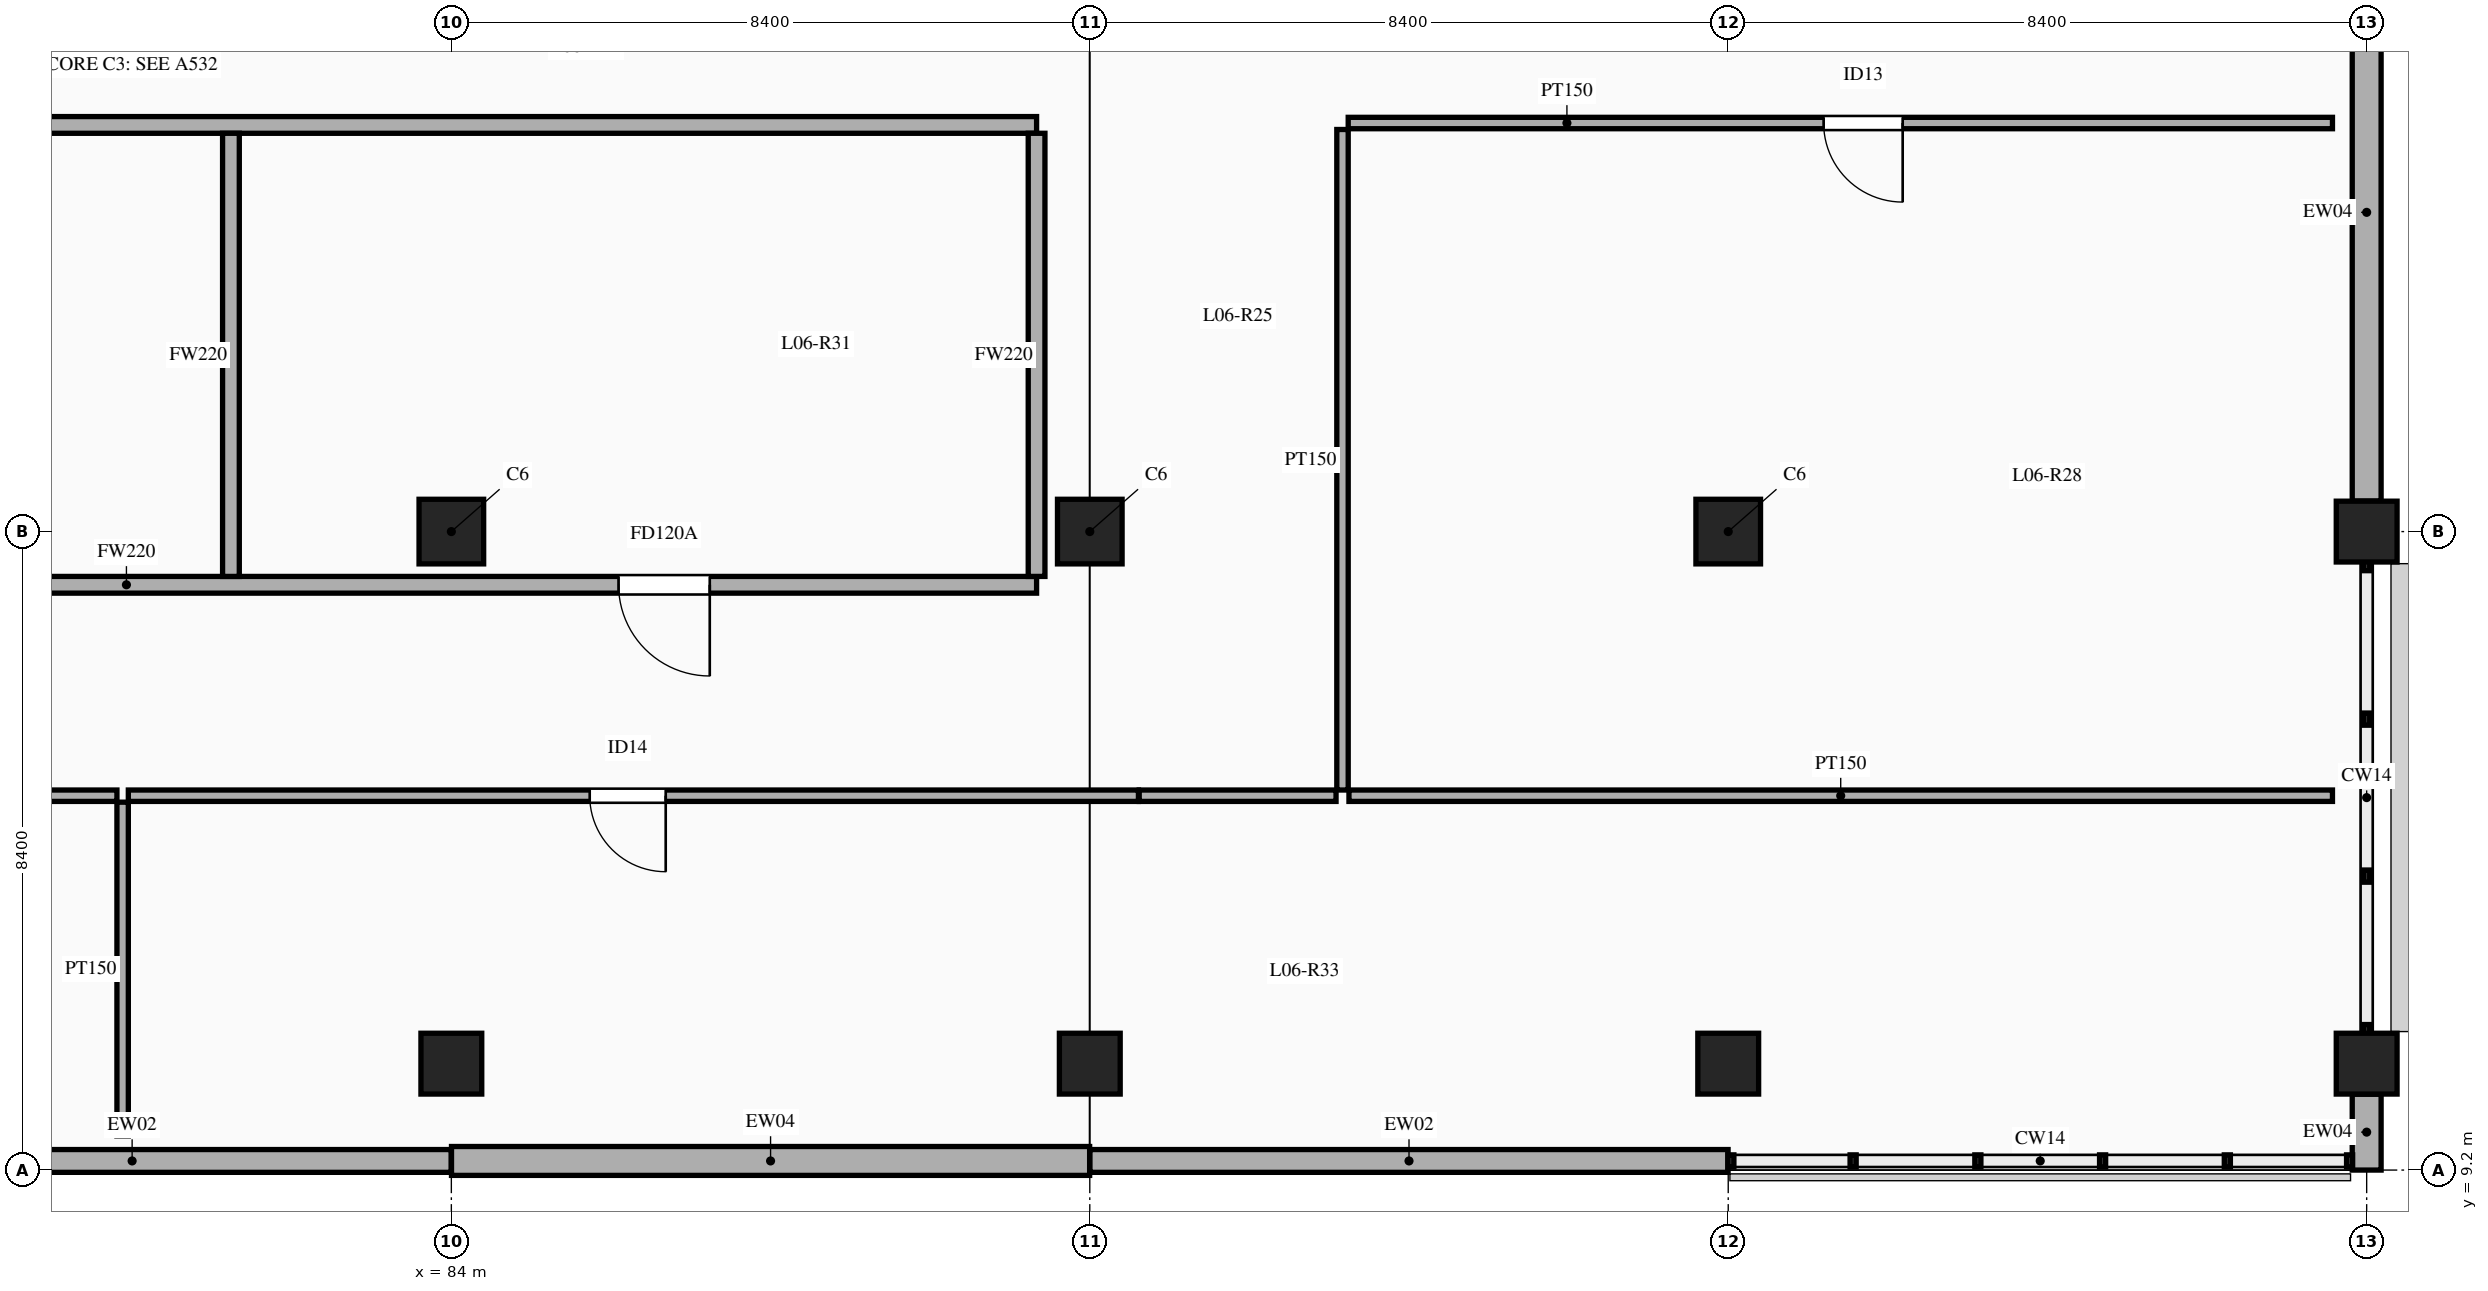
"""IFC4 building model, lengths in metres.
Left out: names, types, materials, properties, quantities, classifications, styles, units other than length and angle.
Written with IfcOpenShell. Run it as: python <this file> out.ifc"""

import sys

from ifc_helpers import new_model, si_unit, direction, frame, frame_2d, origin, origin_2d, place, context, subcontext, project, spatial, rectangle, extrude, element, fill, save


model = new_model("IFC4")
c1 = context("Model", 3, precision=1e-05, world=origin(), true_north=direction((0.0, 1.0)))
c2 = subcontext(c1, "Body", "Model", "MODEL_VIEW")
j1 = project(units=[si_unit("LENGTHUNIT", "METRE"), si_unit("PLANEANGLEUNIT", "RADIAN")], contexts=[c1])
p1 = place(None, origin())
s1 = spatial("IfcSite", under=j1, at=p1, CompositionType="ELEMENT")
p2 = place(p1, origin())
s2 = spatial("IfcBuilding", under=s1, at=p2, CompositionType="ELEMENT")
p3 = place(p2, frame((0.0, 0.0, 28.5)))
s3 = spatial("IfcBuildingStorey", under=s2, at=p3, CompositionType="ELEMENT", Elevation=28.5)
p4 = place(p3, frame((84.0, 10.6, 0.0), z_axis=(0.0, 0.0, 1.0), x_axis=(1.0, 0.0, 0.0)))
e1 = element("IfcColumn", 1, at=p4, inside=s3, PredefinedType="COLUMN", context=c2, shape_type="SweptSolid", body=[
    extrude(rectangle(XDim=0.8, YDim=0.8, at=origin_2d()), origin(), (0.0, 0.0, 1.0), 4.5),
])
p5 = place(p3, frame((84.0, 17.6, 0.0), z_axis=(0.0, 0.0, 1.0), x_axis=(1.0, 0.0, 0.0)))
e2 = element("IfcColumn", 2, at=p5, inside=s3, PredefinedType="COLUMN", context=c2, shape_type="SweptSolid", body=[
    extrude(rectangle(XDim=0.85, YDim=0.85, at=origin_2d()), origin(), (0.0, 0.0, 1.0), 4.5),
])
p6 = place(p3, frame((92.4, 10.6, 0.0), z_axis=(0.0, 0.0, 1.0), x_axis=(1.0, 0.0, 0.0)))
e3 = element("IfcColumn", 3, at=p6, inside=s3, PredefinedType="COLUMN", context=c2, shape_type="SweptSolid", body=[
    extrude(rectangle(XDim=0.8, YDim=0.8, at=origin_2d()), origin(), (0.0, 0.0, 1.0), 4.5),
])
p7 = place(p3, frame((92.4, 17.6, 0.0), z_axis=(0.0, 0.0, 1.0), x_axis=(1.0, 0.0, 0.0)))
e4 = element("IfcColumn", 4, at=p7, inside=s3, PredefinedType="COLUMN", context=c2, shape_type="SweptSolid", body=[
    extrude(rectangle(XDim=0.85, YDim=0.85, at=origin_2d()), origin(), (0.0, 0.0, 1.0), 4.5),
])
p8 = place(p3, frame((100.8, 10.6, 0.0), z_axis=(0.0, 0.0, 1.0), x_axis=(1.0, 0.0, 0.0)))
e5 = element("IfcColumn", 5, at=p8, inside=s3, PredefinedType="COLUMN", context=c2, shape_type="SweptSolid", body=[
    extrude(rectangle(XDim=0.8, YDim=0.8, at=origin_2d()), origin(), (0.0, 0.0, 1.0), 4.5),
])
p9 = place(p3, frame((100.8, 17.6, 0.0), z_axis=(0.0, 0.0, 1.0), x_axis=(1.0, 0.0, 0.0)))
e6 = element("IfcColumn", 6, at=p9, inside=s3, PredefinedType="COLUMN", context=c2, shape_type="SweptSolid", body=[
    extrude(rectangle(XDim=0.85, YDim=0.85, at=origin_2d()), origin(), (0.0, 0.0, 1.0), 4.5),
])
for number, where, z_axis, x_axis in (
    (7, (109.2, 10.6, 0.0), (0.0, 0.0, 1.0), (1.0, 0.0, 0.0)),
    (8, (109.2, 17.6, 0.0), (0.0, 0.0, 1.0), (1.0, 0.0, 0.0)),
):
    element("IfcColumn", number, at=place(p3, frame(where, z_axis=z_axis, x_axis=x_axis)), inside=s3, PredefinedType="COLUMN", context=c2, shape_type="SweptSolid", body=[
        extrude(rectangle(XDim=0.8, YDim=0.8, at=origin_2d()), origin(), (0.0, 0.0, 1.0), 4.5),
    ])
p10 = place(p3, frame((109.2, 9.2, 0.0), z_axis=(0.0, 0.0, 1.0), x_axis=(0.0, 1.0, 0.0)))
e9 = element("IfcWall", 9, at=p10, inside=s3, PredefinedType="SOLIDWALL", context=c2, shape_type="SweptSolid", body=[
    extrude(rectangle(XDim=0.998, YDim=0.38, at=frame_2d((0.499, 0.0))), origin(), (0.0, 0.0, 1.0), 3.55),
])
p11 = place(p3, frame((75.602, 9.32, 0.0), z_axis=(0.0, 0.0, 1.0), x_axis=(1.0, 0.0, 0.0)))
e10 = element("IfcWall", 10, at=p11, inside=s3, PredefinedType="SOLIDWALL", context=c2, shape_type="SweptSolid", body=[
    extrude(rectangle(XDim=8.396, YDim=0.3, at=frame_2d((4.198, 0.0))), origin(), (0.0, 0.0, 1.0), 3.55),
])
p12 = place(p3, frame((84.002, 9.32, 0.0), z_axis=(0.0, 0.0, 1.0), x_axis=(1.0, 0.0, 0.0)))
e11 = element("IfcWall", 11, at=p12, inside=s3, PredefinedType="SOLIDWALL", context=c2, shape_type="SweptSolid", body=[
    extrude(rectangle(XDim=8.396, YDim=0.38, at=frame_2d((4.198, 0.0))), origin(), (0.0, 0.0, 1.0), 3.55),
])
p13 = place(p3, frame((92.402, 9.32, 0.0), z_axis=(0.0, 0.0, 1.0), x_axis=(1.0, 0.0, 0.0)))
e12 = element("IfcWall", 12, at=p13, inside=s3, PredefinedType="SOLIDWALL", context=c2, shape_type="SweptSolid", body=[
    extrude(rectangle(XDim=8.396, YDim=0.3, at=frame_2d((4.198, 0.0))), origin(), (0.0, 0.0, 1.0), 3.55),
])
p14 = place(p3, frame((109.2, 18.002, 0.0), z_axis=(0.0, 0.0, 1.0), x_axis=(0.0, 1.0, 0.0)))
e13 = element("IfcWall", 13, at=p14, inside=s3, PredefinedType="SOLIDWALL", context=c2, shape_type="SweptSolid", body=[
    extrude(rectangle(XDim=7.596, YDim=0.38, at=frame_2d((3.798, 0.0))), origin(), (0.0, 0.0, 1.0), 3.55),
])
p15 = place(p3, frame((59.5, 22.95, 0.0), z_axis=(0.0, 0.0, 1.0), x_axis=(1.0, 0.0, 0.0)))
e14 = element("IfcWall", 14, at=p15, inside=s3, PredefinedType="SOLIDWALL", context=c2, shape_type="SweptSolid", body=[
    extrude(rectangle(XDim=32.2, YDim=0.22, at=frame_2d((16.1, 0.0))), origin(), (0.0, 0.0, 1.0), 3.45),
])
p16 = place(p15, frame((3.0, 0.0, 0.0)))
e15 = element("IfcOpeningElement", 15, at=p16, cuts=e14, PredefinedType="OPENING", context=c2, shape_type="SweptSolid", body=[
    extrude(rectangle(XDim=1.2, YDim=2.2, at=frame_2d((0.6, 1.1))), frame((0.0, 0.12, 0.0), z_axis=(0.0, -1.0, 0.0), x_axis=(1.0, 0.0, 0.0)), (0.0, 0.0, 1.0), 0.24),
])
p17 = place(p3, frame((59.5, 16.9, 0.0), z_axis=(0.0, 0.0, 1.0), x_axis=(1.0, 0.0, 0.0)))
e16 = element("IfcWall", 16, at=p17, inside=s3, PredefinedType="SOLIDWALL", context=c2, shape_type="SweptSolid", body=[
    extrude(rectangle(XDim=32.2, YDim=0.22, at=frame_2d((16.1, 0.0))), origin(), (0.0, 0.0, 1.0), 3.45),
])
p18 = place(p17, frame((12.7, 0.0, 0.0)))
e17 = element("IfcOpeningElement", 17, at=p18, cuts=e16, PredefinedType="OPENING", context=c2, shape_type="SweptSolid", body=[
    extrude(rectangle(XDim=1.05, YDim=2.15, at=frame_2d((0.525, 1.075))), frame((0.0, 0.12, 0.0), z_axis=(0.0, -1.0, 0.0), x_axis=(1.0, 0.0, 0.0)), (0.0, 0.0, 1.0), 0.24),
])
p19 = place(p17, frame((26.7, 0.0, 0.0)))
e18 = element("IfcOpeningElement", 18, at=p19, cuts=e16, PredefinedType="OPENING", context=c2, shape_type="SweptSolid", body=[
    extrude(rectangle(XDim=1.2, YDim=2.2, at=frame_2d((0.6, 1.1))), frame((0.0, 0.12, 0.0), z_axis=(0.0, -1.0, 0.0), x_axis=(1.0, 0.0, 0.0)), (0.0, 0.0, 1.0), 0.24),
])
for number, where, z_axis, x_axis in (
    (19, (91.7, 17.01, 0.0), (0.0, 0.0, 1.0), (0.0, 1.0, 0.0)),
    (20, (81.1, 17.01, 0.0), (0.0, 0.0, 1.0), (0.0, 1.0, 0.0)),
):
    element("IfcWall", number, at=place(p3, frame(where, z_axis=z_axis, x_axis=x_axis)), inside=s3, PredefinedType="SOLIDWALL", context=c2, shape_type="SweptSolid", body=[
        extrude(rectangle(XDim=5.83, YDim=0.22, at=frame_2d((2.915, 0.0))), origin(), (0.0, 0.0, 1.0), 3.45),
    ])
p20 = place(p3, frame((95.8, 22.975, 0.0), z_axis=(0.0, 0.0, 1.0), x_axis=(1.0, 0.0, 0.0)))
e21 = element("IfcWall", 21, at=p20, inside=s3, PredefinedType="PARTITIONING", context=c2, shape_type="SweptSolid", body=[
    extrude(rectangle(XDim=12.95, YDim=0.15, at=frame_2d((6.475, 0.0))), origin(), (0.0, 0.0, 1.0), 3.45),
])
p21 = place(p20, frame((6.255, 0.0, 0.0)))
e22 = element("IfcOpeningElement", 22, at=p21, cuts=e21, PredefinedType="OPENING", context=c2, shape_type="SweptSolid", body=[
    extrude(rectangle(XDim=1.04, YDim=2.15, at=frame_2d((0.52, 1.075))), frame((0.0, 0.085, 0.0), z_axis=(0.0, -1.0, 0.0), x_axis=(1.0, 0.0, 0.0)), (0.0, 0.0, 1.0), 0.17),
])
p22 = place(p3, frame((95.725, 14.2, 0.0), z_axis=(0.0, 0.0, 1.0), x_axis=(0.0, 1.0, 0.0)))
e23 = element("IfcWall", 23, at=p22, inside=s3, PredefinedType="PARTITIONING", context=c2, shape_type="SweptSolid", body=[
    extrude(rectangle(XDim=8.69, YDim=0.15, at=frame_2d((4.345, 0.0))), origin(), (0.0, 0.0, 1.0), 3.45),
])
p23 = place(p3, frame((93.05, 14.125, 0.0), z_axis=(0.0, 0.0, 1.0), x_axis=(1.0, 0.0, 0.0)))
e24 = element("IfcWall", 24, at=p23, inside=s3, PredefinedType="PARTITIONING", context=c2, shape_type="SweptSolid", body=[
    extrude(rectangle(XDim=2.59, YDim=0.15, at=frame_2d((1.295, 0.0))), origin(), (0.0, 0.0, 1.0), 3.45),
])
p24 = place(p3, frame((58.16, 14.125, 0.0), z_axis=(0.0, 0.0, 1.0), x_axis=(1.0, 0.0, 0.0)))
e25 = element("IfcWall", 25, at=p24, inside=s3, PredefinedType="PARTITIONING", context=c2, shape_type="SweptSolid", body=[
    extrude(rectangle(XDim=21.44, YDim=0.15, at=frame_2d((10.72, 0.0))), origin(), (0.0, 0.0, 1.0), 3.45),
])
p25 = place(p24, frame((10.145, 0.0, 0.0)))
e26 = element("IfcOpeningElement", 26, at=p25, cuts=e25, PredefinedType="OPENING", context=c2, shape_type="SweptSolid", body=[
    extrude(rectangle(XDim=1.0, YDim=2.15, at=frame_2d((0.5, 1.075))), frame((0.0, 0.085, 0.0), z_axis=(0.0, -1.0, 0.0), x_axis=(1.0, 0.0, 0.0)), (0.0, 0.0, 1.0), 0.17),
])
p26 = place(p3, frame((79.75, 14.125, 0.0), z_axis=(0.0, 0.0, 1.0), x_axis=(1.0, 0.0, 0.0)))
e27 = element("IfcWall", 27, at=p26, inside=s3, PredefinedType="PARTITIONING", context=c2, shape_type="SweptSolid", body=[
    extrude(rectangle(XDim=13.29, YDim=0.15, at=frame_2d((6.645, 0.0))), origin(), (0.0, 0.0, 1.0), 3.45),
])
p27 = place(p26, frame((6.07, 0.0, 0.0)))
e28 = element("IfcOpeningElement", 28, at=p27, cuts=e27, PredefinedType="OPENING", context=c2, shape_type="SweptSolid", body=[
    extrude(rectangle(XDim=1.0, YDim=2.15, at=frame_2d((0.5, 1.075))), frame((0.0, 0.085, 0.0), z_axis=(0.0, -1.0, 0.0), x_axis=(1.0, 0.0, 0.0)), (0.0, 0.0, 1.0), 0.17),
])
p28 = place(p3, frame((95.81, 14.125, 0.0), z_axis=(0.0, 0.0, 1.0), x_axis=(1.0, 0.0, 0.0)))
e29 = element("IfcWall", 29, at=p28, inside=s3, PredefinedType="PARTITIONING", context=c2, shape_type="SweptSolid", body=[
    extrude(rectangle(XDim=12.94, YDim=0.15, at=frame_2d((6.47, 0.0))), origin(), (0.0, 0.0, 1.0), 3.45),
])
p29 = place(p3, frame((79.675, 9.65, 0.0), z_axis=(0.0, 0.0, 1.0), x_axis=(0.0, 1.0, 0.0)))
e30 = element("IfcWall", 30, at=p29, inside=s3, PredefinedType="PARTITIONING", context=c2, shape_type="SweptSolid", body=[
    extrude(rectangle(XDim=4.39, YDim=0.15, at=frame_2d((2.195, 0.0))), origin(), (0.0, 0.0, 1.0), 3.45),
])
p30 = place(p19, frame((1.2, 0.0, 0.0), z_axis=(0.0, 0.0, 1.0), x_axis=(-1.0, 0.0, 0.0)))
e31 = element("IfcDoor", 31, at=p30, inside=s3, OperationType="SINGLE_SWING_LEFT", PredefinedType="DOOR", context=c2, shape_type="SweptSolid", body=[
    extrude(rectangle(XDim=1.2, YDim=2.2, at=frame_2d((0.6, 1.1))), frame((0.0, 0.025, 0.0), z_axis=(0.0, -1.0, 0.0), x_axis=(1.0, 0.0, 0.0)), (0.0, 0.0, 1.0), 0.05),
])
fill(e18, e31)
p31 = place(p21, frame((1.04, 0.0, 0.0), z_axis=(0.0, 0.0, 1.0), x_axis=(-1.0, 0.0, 0.0)))
e32 = element("IfcDoor", 32, at=p31, inside=s3, OperationType="SINGLE_SWING_LEFT", PredefinedType="DOOR", context=c2, shape_type="SweptSolid", body=[
    extrude(rectangle(XDim=1.04, YDim=2.15, at=frame_2d((0.52, 1.075))), frame((0.0, 0.025, 0.0), z_axis=(0.0, -1.0, 0.0), x_axis=(1.0, 0.0, 0.0)), (0.0, 0.0, 1.0), 0.05),
])
fill(e22, e32)
p32 = place(p27, frame((1.0, 0.0, 0.0), z_axis=(0.0, 0.0, 1.0), x_axis=(-1.0, 0.0, 0.0)))
e33 = element("IfcDoor", 33, at=p32, inside=s3, OperationType="SINGLE_SWING_LEFT", PredefinedType="DOOR", context=c2, shape_type="SweptSolid", body=[
    extrude(rectangle(XDim=1.0, YDim=2.15, at=frame_2d((0.5, 1.075))), frame((0.0, 0.025, 0.0), z_axis=(0.0, -1.0, 0.0), x_axis=(1.0, 0.0, 0.0)), (0.0, 0.0, 1.0), 0.05),
])
fill(e28, e33)
save(model, sys.argv[1])
